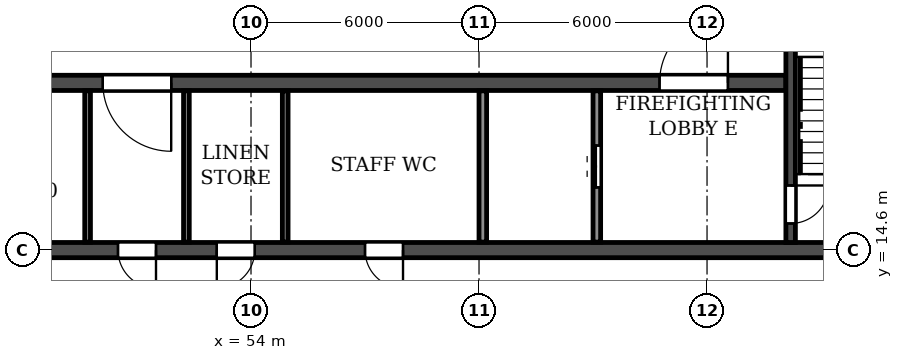
"""IFC4 building model, lengths in metres.
Left out: names, types, materials, properties, quantities, classifications, styles, units other than length and angle.
Written with IfcOpenShell. Run it as: python <this file> out.ifc"""

import sys

from ifc_helpers import new_model, si_unit, direction, frame, frame_2d, origin, place, context, subcontext, project, spatial, rectangle, extrude, element, fill, save


model = new_model("IFC4")
c1 = context("Model", 3, precision=1e-05, world=origin(), true_north=direction((0.0, 1.0)))
c2 = subcontext(c1, "Body", "Model", "MODEL_VIEW")
j1 = project(units=[si_unit("LENGTHUNIT", "METRE"), si_unit("PLANEANGLEUNIT", "RADIAN")], contexts=[c1])
p1 = place(None, origin())
s1 = spatial("IfcSite", under=j1, at=p1, CompositionType="ELEMENT")
p2 = place(p1, origin())
s2 = spatial("IfcBuilding", under=s1, at=p2, CompositionType="ELEMENT")
p3 = place(p2, frame((0.0, 0.0, 201.6)))
s3 = spatial("IfcBuildingStorey", under=s2, at=p3, CompositionType="ELEMENT", Elevation=201.6)
p4 = place(p3, frame((18.2, 14.6, 0.0), z_axis=(0.0, 0.0, 1.0), x_axis=(1.0, 0.0, 0.0)))
e1 = element("IfcWall", 1, at=p4, inside=s3, PredefinedType="SOLIDWALL", context=c2, shape_type="SweptSolid", body=[
    extrude(rectangle(XDim=65.6, YDim=0.4, at=frame_2d((32.8, 0.0))), origin(), (0.0, 0.0, 1.0), 3.08),
])
p5 = place(p4, frame((0.7, 0.0, 0.0)))
e2 = element("IfcOpeningElement", 2, at=p5, cuts=e1, PredefinedType="OPENING", context=c2, shape_type="SweptSolid", body=[
    extrude(rectangle(XDim=1.0, YDim=2.1, at=frame_2d((0.5, 1.05))), frame((0.0, 0.21, 0.0), z_axis=(0.0, -1.0, 0.0), x_axis=(1.0, 0.0, 0.0)), (0.0, 0.0, 1.0), 0.42),
])
p6 = place(p4, frame((8.6, 0.0, 0.0)))
e3 = element("IfcOpeningElement", 3, at=p6, cuts=e1, PredefinedType="OPENING", context=c2, shape_type="SweptSolid", body=[
    extrude(rectangle(XDim=1.0, YDim=2.1, at=frame_2d((0.5, 1.05))), frame((0.0, 0.21, 0.0), z_axis=(0.0, -1.0, 0.0), x_axis=(1.0, 0.0, 0.0)), (0.0, 0.0, 1.0), 0.42),
])
p7 = place(p4, frame((13.2, 0.0, 0.0)))
e4 = element("IfcOpeningElement", 4, at=p7, cuts=e1, PredefinedType="OPENING", context=c2, shape_type="SweptSolid", body=[
    extrude(rectangle(XDim=1.0, YDim=2.1, at=frame_2d((0.5, 1.05))), frame((0.0, 0.21, 0.0), z_axis=(0.0, -1.0, 0.0), x_axis=(1.0, 0.0, 0.0)), (0.0, 0.0, 1.0), 0.42),
])
p8 = place(p4, frame((27.1, 0.0, 0.0)))
e5 = element("IfcOpeningElement", 5, at=p8, cuts=e1, PredefinedType="OPENING", context=c2, shape_type="SweptSolid", body=[
    extrude(rectangle(XDim=1.0, YDim=2.1, at=frame_2d((0.5, 1.05))), frame((0.0, 0.21, 0.0), z_axis=(0.0, -1.0, 0.0), x_axis=(1.0, 0.0, 0.0)), (0.0, 0.0, 1.0), 0.42),
])
p9 = place(p4, frame((32.3, 0.0, 0.0)))
e6 = element("IfcOpeningElement", 6, at=p9, cuts=e1, PredefinedType="OPENING", context=c2, shape_type="SweptSolid", body=[
    extrude(rectangle(XDim=1.0, YDim=2.1, at=frame_2d((0.5, 1.05))), frame((0.0, 0.21, 0.0), z_axis=(0.0, -1.0, 0.0), x_axis=(1.0, 0.0, 0.0)), (0.0, 0.0, 1.0), 0.42),
])
p10 = place(p4, frame((34.9, 0.0, 0.0)))
e7 = element("IfcOpeningElement", 7, at=p10, cuts=e1, PredefinedType="OPENING", context=c2, shape_type="SweptSolid", body=[
    extrude(rectangle(XDim=1.0, YDim=2.1, at=frame_2d((0.5, 1.05))), frame((0.0, 0.21, 0.0), z_axis=(0.0, -1.0, 0.0), x_axis=(1.0, 0.0, 0.0)), (0.0, 0.0, 1.0), 0.42),
])
p11 = place(p4, frame((38.8, 0.0, 0.0)))
e8 = element("IfcOpeningElement", 8, at=p11, cuts=e1, PredefinedType="OPENING", context=c2, shape_type="SweptSolid", body=[
    extrude(rectangle(XDim=1.0, YDim=2.1, at=frame_2d((0.5, 1.05))), frame((0.0, 0.21, 0.0), z_axis=(0.0, -1.0, 0.0), x_axis=(1.0, 0.0, 0.0)), (0.0, 0.0, 1.0), 0.42),
])
p12 = place(p4, frame((51.4, 0.0, 0.0)))
e9 = element("IfcOpeningElement", 9, at=p12, cuts=e1, PredefinedType="OPENING", context=c2, shape_type="SweptSolid", body=[
    extrude(rectangle(XDim=1.0, YDim=2.1, at=frame_2d((0.5, 1.05))), frame((0.0, 0.21, 0.0), z_axis=(0.0, -1.0, 0.0), x_axis=(1.0, 0.0, 0.0)), (0.0, 0.0, 1.0), 0.42),
])
p13 = place(p4, frame((56.0, 0.0, 0.0)))
e10 = element("IfcOpeningElement", 10, at=p13, cuts=e1, PredefinedType="OPENING", context=c2, shape_type="SweptSolid", body=[
    extrude(rectangle(XDim=1.0, YDim=2.1, at=frame_2d((0.5, 1.05))), frame((0.0, 0.21, 0.0), z_axis=(0.0, -1.0, 0.0), x_axis=(1.0, 0.0, 0.0)), (0.0, 0.0, 1.0), 0.42),
])
p14 = place(p4, frame((63.9, 0.0, 0.0)))
e11 = element("IfcOpeningElement", 11, at=p14, cuts=e1, PredefinedType="OPENING", context=c2, shape_type="SweptSolid", body=[
    extrude(rectangle(XDim=1.0, YDim=2.1, at=frame_2d((0.5, 1.05))), frame((0.0, 0.21, 0.0), z_axis=(0.0, -1.0, 0.0), x_axis=(1.0, 0.0, 0.0)), (0.0, 0.0, 1.0), 0.42),
])
p15 = place(p3, frame((33.925, 19.0, 0.0), z_axis=(0.0, 0.0, 1.0), x_axis=(1.0, 0.0, 0.0)))
e12 = element("IfcWall", 12, at=p15, inside=s3, PredefinedType="SOLIDWALL", context=c2, shape_type="SweptSolid", body=[
    extrude(rectangle(XDim=34.15, YDim=0.4, at=frame_2d((17.075, 0.0))), origin(), (0.0, 0.0, 1.0), 3.08),
])
p16 = place(p15, frame((16.175, 0.0, 0.0)))
e13 = element("IfcOpeningElement", 13, at=p16, cuts=e12, PredefinedType="OPENING", context=c2, shape_type="SweptSolid", body=[
    extrude(rectangle(XDim=1.8, YDim=2.1, at=frame_2d((0.9, 1.05))), frame((0.0, 0.21, 0.0), z_axis=(0.0, -1.0, 0.0), x_axis=(1.0, 0.0, 0.0)), (0.0, 0.0, 1.0), 0.42),
])
p17 = place(p15, frame((1.525, 0.0, 0.0)))
e14 = element("IfcOpeningElement", 14, at=p17, cuts=e12, PredefinedType="OPENING", context=c2, shape_type="SweptSolid", body=[
    extrude(rectangle(XDim=1.8, YDim=2.1, at=frame_2d((0.9, 1.05))), frame((0.0, 0.21, 0.0), z_axis=(0.0, -1.0, 0.0), x_axis=(1.0, 0.0, 0.0)), (0.0, 0.0, 1.0), 0.42),
])
p18 = place(p15, frame((30.825, 0.0, 0.0)))
e15 = element("IfcOpeningElement", 15, at=p18, cuts=e12, PredefinedType="OPENING", context=c2, shape_type="SweptSolid", body=[
    extrude(rectangle(XDim=1.8, YDim=2.1, at=frame_2d((0.9, 1.05))), frame((0.0, 0.21, 0.0), z_axis=(0.0, -1.0, 0.0), x_axis=(1.0, 0.0, 0.0)), (0.0, 0.0, 1.0), 0.42),
])
p19 = place(p3, frame((68.2, 14.8, 0.0), z_axis=(0.0, 0.0, 1.0), x_axis=(0.0, 1.0, 0.0)))
e16 = element("IfcWall", 16, at=p19, inside=s3, PredefinedType="SOLIDWALL", context=c2, shape_type="SweptSolid", body=[
    extrude(rectangle(XDim=7.675, YDim=0.25, at=frame_2d((3.837, 0.0))), origin(), (0.0, 0.0, 1.0), 3.08),
])
p20 = place(p19, frame((0.5, 0.0, 0.0)))
e17 = element("IfcOpeningElement", 17, at=p20, cuts=e16, PredefinedType="OPENING", context=c2, shape_type="SweptSolid", body=[
    extrude(rectangle(XDim=1.0, YDim=2.1, at=frame_2d((0.5, 1.05))), frame((0.0, 0.135, 0.0), z_axis=(0.0, -1.0, 0.0), x_axis=(1.0, 0.0, 0.0)), (0.0, 0.0, 1.0), 0.27),
])
for number, where, z_axis, x_axis in (
    (18, (49.7, 14.81, 0.0), (0.0, 0.0, 1.0), (0.0, 1.0, 0.0)),
    (19, (52.3, 14.81, 0.0), (0.0, 0.0, 1.0), (0.0, 1.0, 0.0)),
    (20, (54.9, 14.81, 0.0), (0.0, 0.0, 1.0), (0.0, 1.0, 0.0)),
):
    element("IfcWall", number, at=place(p3, frame(where, z_axis=z_axis, x_axis=x_axis)), inside=s3, PredefinedType="PARTITIONING", context=c2, shape_type="SweptSolid", body=[
        extrude(rectangle(XDim=3.98, YDim=0.15, at=frame_2d((1.99, 0.0))), origin(), (0.0, 0.0, 1.0), 3.08),
    ])
p21 = place(p3, frame((60.1, 14.81, 0.0), z_axis=(0.0, 0.0, 1.0), x_axis=(0.0, 1.0, 0.0)))
e21 = element("IfcWall", 21, at=p21, inside=s3, PredefinedType="PARTITIONING", context=c2, shape_type="SweptSolid", body=[
    extrude(rectangle(XDim=3.98, YDim=0.2, at=frame_2d((1.99, 0.0))), origin(), (0.0, 0.0, 1.0), 3.08),
])
p22 = place(p3, frame((63.1, 14.81, 0.0), z_axis=(0.0, 0.0, 1.0), x_axis=(0.0, 1.0, 0.0)))
e22 = element("IfcWall", 22, at=p22, inside=s3, PredefinedType="PARTITIONING", context=c2, shape_type="SweptSolid", body=[
    extrude(rectangle(XDim=3.98, YDim=0.2, at=frame_2d((1.99, 0.0))), origin(), (0.0, 0.0, 1.0), 3.08),
])
p23 = place(p22, frame((1.44, 0.0, 0.0)))
e23 = element("IfcOpeningElement", 23, at=p23, cuts=e22, PredefinedType="OPENING", context=c2, shape_type="SweptSolid", body=[
    extrude(rectangle(XDim=1.1, YDim=2.1, at=frame_2d((0.55, 1.05))), frame((0.0, 0.11, 0.0), z_axis=(0.0, -1.0, 0.0), x_axis=(1.0, 0.0, 0.0)), (0.0, 0.0, 1.0), 0.22),
])
p24 = place(p9, frame((1.0, 0.0, 0.0), z_axis=(0.0, 0.0, 1.0), x_axis=(-1.0, 0.0, 0.0)))
e24 = element("IfcDoor", 24, at=p24, inside=s3, OperationType="SINGLE_SWING_LEFT", PredefinedType="DOOR", context=c2, shape_type="SweptSolid", body=[
    extrude(rectangle(XDim=1.0, YDim=2.1, at=frame_2d((0.5, 1.05))), frame((0.0, 0.025, 0.0), z_axis=(0.0, -1.0, 0.0), x_axis=(1.0, 0.0, 0.0)), (0.0, 0.0, 1.0), 0.05),
])
fill(e6, e24)
p25 = place(p10, frame((1.0, 0.0, 0.0), z_axis=(0.0, 0.0, 1.0), x_axis=(-1.0, 0.0, 0.0)))
e25 = element("IfcDoor", 25, at=p25, inside=s3, OperationType="SINGLE_SWING_RIGHT", PredefinedType="DOOR", context=c2, shape_type="SweptSolid", body=[
    extrude(rectangle(XDim=1.0, YDim=2.1, at=frame_2d((0.5, 1.05))), frame((0.0, 0.025, 0.0), z_axis=(0.0, -1.0, 0.0), x_axis=(1.0, 0.0, 0.0)), (0.0, 0.0, 1.0), 0.05),
])
fill(e7, e25)
p26 = place(p11, frame((1.0, 0.0, 0.0), z_axis=(0.0, 0.0, 1.0), x_axis=(-1.0, 0.0, 0.0)))
e26 = element("IfcDoor", 26, at=p26, inside=s3, OperationType="SINGLE_SWING_LEFT", PredefinedType="DOOR", context=c2, shape_type="SweptSolid", body=[
    extrude(rectangle(XDim=1.0, YDim=2.1, at=frame_2d((0.5, 1.05))), frame((0.0, 0.025, 0.0), z_axis=(0.0, -1.0, 0.0), x_axis=(1.0, 0.0, 0.0)), (0.0, 0.0, 1.0), 0.05),
])
fill(e8, e26)
p27 = place(p23, origin())
e27 = element("IfcDoor", 27, at=p27, inside=s3, OperationType="DOUBLE_DOOR_SLIDING", PredefinedType="DOOR", context=c2, shape_type="SweptSolid", body=[
    extrude(rectangle(XDim=1.1, YDim=2.1, at=frame_2d((0.55, 1.05))), frame((0.0, 0.025, 0.0), z_axis=(0.0, -1.0, 0.0), x_axis=(1.0, 0.0, 0.0)), (0.0, 0.0, 1.0), 0.05),
])
fill(e23, e27)
p28 = place(p20, frame((1.0, 0.0, 0.0), z_axis=(0.0, 0.0, 1.0), x_axis=(-1.0, 0.0, 0.0)))
e28 = element("IfcDoor", 28, at=p28, inside=s3, OperationType="SINGLE_SWING_LEFT", PredefinedType="DOOR", context=c2, shape_type="SweptSolid", body=[
    extrude(rectangle(XDim=1.0, YDim=2.1, at=frame_2d((0.5, 1.05))), frame((0.0, 0.025, 0.0), z_axis=(0.0, -1.0, 0.0), x_axis=(1.0, 0.0, 0.0)), (0.0, 0.0, 1.0), 0.05),
])
fill(e17, e28)
p29 = place(p16, frame((1.8, 0.0, 0.0), z_axis=(0.0, 0.0, 1.0), x_axis=(-1.0, 0.0, 0.0)))
e29 = element("IfcDoor", 29, at=p29, inside=s3, OperationType="DOUBLE_DOOR_SINGLE_SWING", PredefinedType="DOOR", context=c2, shape_type="SweptSolid", body=[
    extrude(rectangle(XDim=1.8, YDim=2.1, at=frame_2d((0.9, 1.05))), frame((0.0, 0.025, 0.0), z_axis=(0.0, -1.0, 0.0), x_axis=(1.0, 0.0, 0.0)), (0.0, 0.0, 1.0), 0.05),
])
fill(e13, e29)
p30 = place(p18, origin())
e30 = element("IfcDoor", 30, at=p30, inside=s3, OperationType="DOUBLE_DOOR_SINGLE_SWING", PredefinedType="DOOR", context=c2, shape_type="SweptSolid", body=[
    extrude(rectangle(XDim=1.8, YDim=2.1, at=frame_2d((0.9, 1.05))), frame((0.0, 0.025, 0.0), z_axis=(0.0, -1.0, 0.0), x_axis=(1.0, 0.0, 0.0)), (0.0, 0.0, 1.0), 0.05),
])
fill(e15, e30)
save(model, sys.argv[1])
